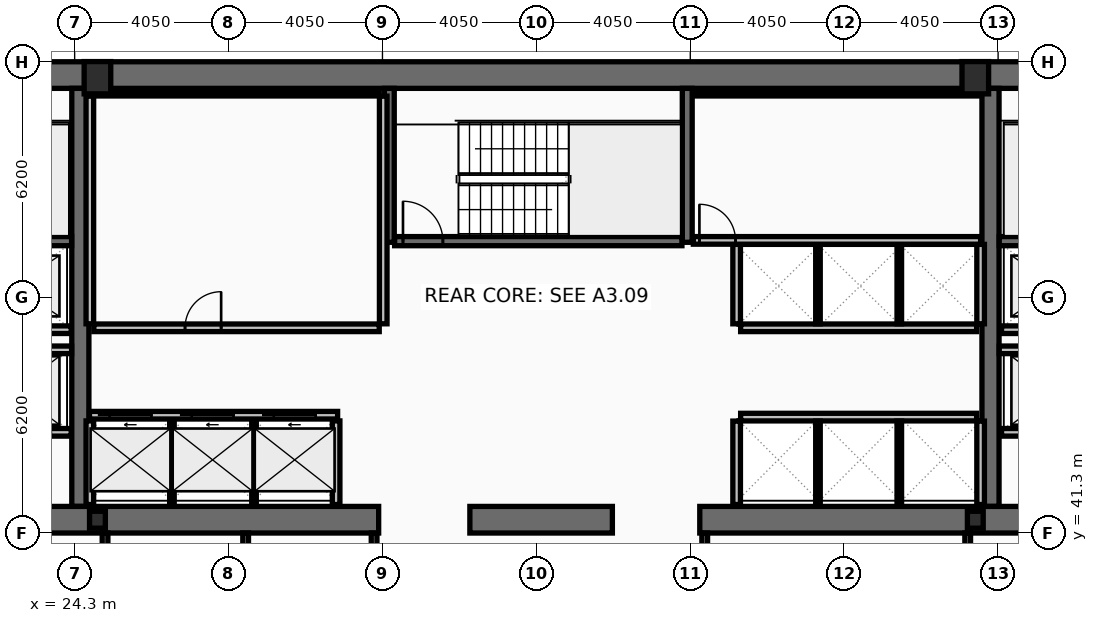
"""IFC4 building model, lengths in metres.
Left out: names, types, materials, properties, quantities, classifications, styles, units other than length and angle.
Written with IfcOpenShell. Run it as: python <this file> out.ifc"""

import sys

from ifc_helpers import new_model, si_unit, direction, frame, frame_2d, origin, origin_2d, place, context, subcontext, project, spatial, rectangle, hollow_rectangle, i_section, extrude, element, fill, save


model = new_model("IFC4")
c1 = context("Model", 3, precision=1e-05, world=origin(), true_north=direction((0.0, 1.0)))
c2 = subcontext(c1, "Body", "Model", "MODEL_VIEW")
j1 = project(units=[si_unit("LENGTHUNIT", "METRE"), si_unit("PLANEANGLEUNIT", "RADIAN")], contexts=[c1])
p1 = place(None, origin())
s1 = spatial("IfcSite", under=j1, at=p1, CompositionType="ELEMENT")
p2 = place(p1, origin())
s2 = spatial("IfcBuilding", under=s1, at=p2, CompositionType="ELEMENT")
p3 = place(p2, frame((0.0, 0.0, 139.8)))
s3 = spatial("IfcBuildingStorey", under=s2, at=p3, CompositionType="ELEMENT", Elevation=139.8)
p4 = place(p3, frame((16.2, 53.35, 0.0), z_axis=(0.0, 0.0, 1.0), x_axis=(1.0, 0.0, 0.0)))
e1 = element("IfcWall", 1, at=p4, inside=s3, PredefinedType="SHEAR", context=c2, shape_type="SweptSolid", body=[
    extrude(rectangle(XDim=40.5, YDim=0.7, at=frame_2d((20.25, 0.0))), origin(), (0.0, 0.0, 1.0), 3.44),
])
for number, where, z_axis, x_axis in (
    (2, (24.45, 42.0, 0.0), (0.0, 0.0, 1.0), (0.0, 1.0, 0.0)),
    (3, (48.4, 42.0, 0.0), (0.0, 0.0, 1.0), (0.0, 1.0, 0.0)),
):
    element("IfcWall", number, at=place(p3, frame(where, z_axis=z_axis, x_axis=x_axis)), inside=s3, PredefinedType="SHEAR", context=c2, shape_type="SweptSolid", body=[
        extrude(rectangle(XDim=11.0, YDim=0.45, at=frame_2d((5.5, 0.0))), origin(), (0.0, 0.0, 1.0), 3.44),
    ])
p5 = place(p3, frame((32.3, 41.65, 0.0), z_axis=(0.0, 0.0, 1.0), x_axis=(-1.0, 0.0, 0.0)))
e4 = element("IfcWall", 4, at=p5, inside=s3, PredefinedType="SHEAR", context=c2, shape_type="SweptSolid", body=[
    extrude(rectangle(XDim=11.45, YDim=0.7, at=frame_2d((5.725, 0.0))), origin(), (0.0, 0.0, 1.0), 3.44),
])
p6 = place(p3, frame((38.45, 41.65, 0.0), z_axis=(0.0, 0.0, 1.0), x_axis=(-1.0, 0.0, 0.0)))
e5 = element("IfcWall", 5, at=p6, inside=s3, PredefinedType="SHEAR", context=c2, shape_type="SweptSolid", body=[
    extrude(rectangle(XDim=3.75, YDim=0.7, at=frame_2d((1.875, 0.0))), origin(), (0.0, 0.0, 1.0), 3.44),
])
p7 = place(p3, frame((52.05, 41.65, 0.0), z_axis=(0.0, 0.0, 1.0), x_axis=(-1.0, 0.0, 0.0)))
e6 = element("IfcWall", 6, at=p7, inside=s3, PredefinedType="SHEAR", context=c2, shape_type="SweptSolid", body=[
    extrude(rectangle(XDim=11.3, YDim=0.7, at=frame_2d((5.65, 0.0))), origin(), (0.0, 0.0, 1.0), 3.44),
])
for number, where, z_axis, x_axis in (
    (7, (32.58, 48.95, 0.0), (0.0, 0.0, 1.0), (0.0, 1.0, 0.0)),
    (8, (40.42, 48.95, 0.0), (0.0, 0.0, 1.0), (0.0, 1.0, 0.0)),
):
    element("IfcWall", number, at=place(p3, frame(where, z_axis=z_axis, x_axis=x_axis)), inside=s3, PredefinedType="SHEAR", context=c2, shape_type="SweptSolid", body=[
        extrude(rectangle(XDim=4.05, YDim=0.26, at=frame_2d((2.025, 0.0))), origin(), (0.0, 0.0, 1.0), 3.44),
    ])
p8 = place(p3, frame((16.9, 48.98, 0.0), z_axis=(0.0, 0.0, 1.0), x_axis=(1.0, 0.0, 0.0)))
e9 = element("IfcWall", 9, at=p8, inside=s3, PredefinedType="SHEAR", context=c2, shape_type="SweptSolid", body=[
    extrude(rectangle(XDim=7.32, YDim=0.24, at=frame_2d((3.66, 0.0))), origin(), (0.0, 0.0, 1.0), 3.44),
])
p9 = place(p8, frame((0.22, 0.0, 0.0)))
e10 = element("IfcOpeningElement", 10, at=p9, cuts=e9, PredefinedType="OPENING", context=c2, shape_type="SweptSolid", body=[
    extrude(rectangle(XDim=1.05, YDim=2.15, at=frame_2d((0.525, 1.075))), frame((0.0, 0.13, 0.0), z_axis=(0.0, -1.0, 0.0), x_axis=(1.0, 0.0, 0.0)), (0.0, 0.0, 1.0), 0.26),
])
p10 = place(p3, frame((48.63, 48.98, 0.0), z_axis=(0.0, 0.0, 1.0), x_axis=(1.0, 0.0, 0.0)))
e11 = element("IfcWall", 11, at=p10, inside=s3, PredefinedType="SHEAR", context=c2, shape_type="SweptSolid", body=[
    extrude(rectangle(XDim=7.37, YDim=0.24, at=frame_2d((3.685, 0.0))), origin(), (0.0, 0.0, 1.0), 3.44),
])
p11 = place(p10, frame((6.1, 0.0, 0.0)))
e12 = element("IfcOpeningElement", 12, at=p11, cuts=e11, PredefinedType="OPENING", context=c2, shape_type="SweptSolid", body=[
    extrude(rectangle(XDim=1.05, YDim=2.15, at=frame_2d((0.525, 1.075))), frame((0.0, 0.13, 0.0), z_axis=(0.0, -1.0, 0.0), x_axis=(1.0, 0.0, 0.0)), (0.0, 0.0, 1.0), 0.26),
])
p12 = place(p3, frame((32.72, 48.98, 0.0), z_axis=(0.0, 0.0, 1.0), x_axis=(1.0, 0.0, 0.0)))
e13 = element("IfcWall", 13, at=p12, inside=s3, PredefinedType="SHEAR", context=c2, shape_type="SweptSolid", body=[
    extrude(rectangle(XDim=7.56, YDim=0.24, at=frame_2d((3.78, 0.0))), origin(), (0.0, 0.0, 1.0), 3.44),
])
p13 = place(p12, frame((0.22, 0.0, 0.0)))
e14 = element("IfcOpeningElement", 14, at=p13, cuts=e13, PredefinedType="OPENING", context=c2, shape_type="SweptSolid", body=[
    extrude(rectangle(XDim=1.05, YDim=2.15, at=frame_2d((0.525, 1.075))), frame((0.0, 0.13, 0.0), z_axis=(0.0, -1.0, 0.0), x_axis=(1.0, 0.0, 0.0)), (0.0, 0.0, 1.0), 0.26),
])
for number, where, z_axis, x_axis in (
    (15, (24.9, 53.28, 0.0), (0.0, 0.0, 1.0), (1.0, 0.0, 0.0)),
    (16, (48.0, 53.28, 0.0), (0.0, 0.0, 1.0), (1.0, 0.0, 0.0)),
):
    element("IfcColumn", number, at=place(p3, frame(where, z_axis=z_axis, x_axis=x_axis)), inside=s3, PredefinedType="COLUMN", context=c2, shape_type="SweptSolid", body=[
        extrude(hollow_rectangle(XDim=0.7, YDim=0.85, WallThickness=0.05, at=origin_2d()), origin(), (0.0, 0.0, 1.0), 3.6),
    ])
for number, where, z_axis, x_axis in (
    (17, (24.9, 41.65, 0.0), (0.0, 0.0, 1.0), (1.0, 0.0, 0.0)),
    (18, (48.0, 41.65, 0.0), (0.0, 0.0, 1.0), (1.0, 0.0, 0.0)),
):
    element("IfcColumn", number, at=place(p3, frame(where, z_axis=z_axis, x_axis=x_axis)), inside=s3, PredefinedType="COLUMN", context=c2, shape_type="SweptSolid", body=[
        extrude(i_section(OverallWidth=0.416, OverallDepth=0.446, WebThickness=0.039, FlangeThickness=0.063, at=origin_2d()), origin(), (0.0, 0.0, 1.0), 3.6),
    ])
p14 = place(p3, frame((24.69, 44.4, 0.0), z_axis=(0.0, 0.0, 1.0), x_axis=(1.0, 0.0, 0.0)))
e19 = element("IfcWall", 19, at=p14, inside=s3, PredefinedType="PARTITIONING", context=c2, shape_type="SweptSolid", body=[
    extrude(rectangle(XDim=6.53, YDim=0.2, at=frame_2d((3.265, 0.0))), origin(), (0.0, 0.0, 1.0), 3.44),
])
p15 = place(p14, frame((0.53, 0.0, 0.0)))
e20 = element("IfcOpeningElement", 20, at=p15, cuts=e19, PredefinedType="OPENING", context=c2, shape_type="SweptSolid", body=[
    extrude(rectangle(XDim=1.1, YDim=2.18, at=frame_2d((0.55, 1.09))), frame((0.0, 0.11, 0.0), z_axis=(0.0, -1.0, 0.0), x_axis=(1.0, 0.0, 0.0)), (0.0, 0.0, 1.0), 0.22),
])
p16 = place(p14, frame((2.69, 0.0, 0.0)))
e21 = element("IfcOpeningElement", 21, at=p16, cuts=e19, PredefinedType="OPENING", context=c2, shape_type="SweptSolid", body=[
    extrude(rectangle(XDim=1.1, YDim=2.18, at=frame_2d((0.55, 1.09))), frame((0.0, 0.11, 0.0), z_axis=(0.0, -1.0, 0.0), x_axis=(1.0, 0.0, 0.0)), (0.0, 0.0, 1.0), 0.22),
])
p17 = place(p14, frame((4.85, 0.0, 0.0)))
e22 = element("IfcOpeningElement", 22, at=p17, cuts=e19, PredefinedType="OPENING", context=c2, shape_type="SweptSolid", body=[
    extrude(rectangle(XDim=1.1, YDim=2.18, at=frame_2d((0.55, 1.09))), frame((0.0, 0.11, 0.0), z_axis=(0.0, -1.0, 0.0), x_axis=(1.0, 0.0, 0.0)), (0.0, 0.0, 1.0), 0.22),
])
p18 = place(p3, frame((51.61, 43.95, 0.0), z_axis=(0.0, 0.0, 1.0), x_axis=(-1.0, 0.0, 0.0)))
e23 = element("IfcWall", 23, at=p18, inside=s3, PredefinedType="PARTITIONING", context=c2, shape_type="SweptSolid", body=[
    extrude(rectangle(XDim=2.92, YDim=0.2, at=frame_2d((1.46, 0.0))), origin(), (0.0, 0.0, 1.0), 3.44),
])
p19 = place(p18, frame((0.81, 0.0, 0.0)))
e24 = element("IfcOpeningElement", 24, at=p19, cuts=e23, PredefinedType="OPENING", context=c2, shape_type="SweptSolid", body=[
    extrude(rectangle(XDim=1.3, YDim=2.18, at=frame_2d((0.65, 1.09))), frame((0.0, 0.11, 0.0), z_axis=(0.0, -1.0, 0.0), x_axis=(1.0, 0.0, 0.0)), (0.0, 0.0, 1.0), 0.22),
])
p20 = place(p3, frame((24.21, 43.95, 0.0), z_axis=(0.0, 0.0, 1.0), x_axis=(-1.0, 0.0, 0.0)))
e25 = element("IfcWall", 25, at=p20, inside=s3, PredefinedType="PARTITIONING", context=c2, shape_type="SweptSolid", body=[
    extrude(rectangle(XDim=2.97, YDim=0.2, at=frame_2d((1.485, 0.0))), origin(), (0.0, 0.0, 1.0), 3.44),
])
p21 = place(p20, frame((0.86, 0.0, 0.0)))
e26 = element("IfcOpeningElement", 26, at=p21, cuts=e25, PredefinedType="OPENING", context=c2, shape_type="SweptSolid", body=[
    extrude(rectangle(XDim=1.3, YDim=2.18, at=frame_2d((0.65, 1.09))), frame((0.0, 0.11, 0.0), z_axis=(0.0, -1.0, 0.0), x_axis=(1.0, 0.0, 0.0)), (0.0, 0.0, 1.0), 0.22),
])
p22 = place(p3, frame((51.61, 46.65, 0.0), z_axis=(0.0, 0.0, 1.0), x_axis=(-1.0, 0.0, 0.0)))
e27 = element("IfcWall", 27, at=p22, inside=s3, PredefinedType="PARTITIONING", context=c2, shape_type="SweptSolid", body=[
    extrude(rectangle(XDim=2.92, YDim=0.2, at=frame_2d((1.46, 0.0))), origin(), (0.0, 0.0, 1.0), 3.44),
])
p23 = place(p22, frame((0.86, 0.0, 0.0)))
e28 = element("IfcOpeningElement", 28, at=p23, cuts=e27, PredefinedType="OPENING", context=c2, shape_type="SweptSolid", body=[
    extrude(rectangle(XDim=1.2, YDim=2.18, at=frame_2d((0.6, 1.09))), frame((0.0, 0.11, 0.0), z_axis=(0.0, -1.0, 0.0), x_axis=(1.0, 0.0, 0.0)), (0.0, 0.0, 1.0), 0.22),
])
p24 = place(p3, frame((24.21, 46.65, 0.0), z_axis=(0.0, 0.0, 1.0), x_axis=(-1.0, 0.0, 0.0)))
e29 = element("IfcWall", 29, at=p24, inside=s3, PredefinedType="PARTITIONING", context=c2, shape_type="SweptSolid", body=[
    extrude(rectangle(XDim=2.97, YDim=0.2, at=frame_2d((1.485, 0.0))), origin(), (0.0, 0.0, 1.0), 3.44),
])
p25 = place(p24, frame((0.91, 0.0, 0.0)))
e30 = element("IfcOpeningElement", 30, at=p25, cuts=e29, PredefinedType="OPENING", context=c2, shape_type="SweptSolid", body=[
    extrude(rectangle(XDim=1.2, YDim=2.18, at=frame_2d((0.6, 1.09))), frame((0.0, 0.11, 0.0), z_axis=(0.0, -1.0, 0.0), x_axis=(1.0, 0.0, 0.0)), (0.0, 0.0, 1.0), 0.22),
])
p26 = place(p3, frame((21.2, 46.12, 0.0), z_axis=(0.0, 0.0, 1.0), x_axis=(1.0, 0.0, 0.0)))
e31 = element("IfcWall", 31, at=p26, inside=s3, PredefinedType="PARTITIONING", context=c2, shape_type="SweptSolid", body=[
    extrude(rectangle(XDim=3.02, YDim=0.2, at=frame_2d((1.51, 0.0))), origin(), (0.0, 0.0, 1.0), 3.44),
])
p27 = place(p3, frame((48.63, 46.12, 0.0), z_axis=(0.0, 0.0, 1.0), x_axis=(1.0, 0.0, 0.0)))
e32 = element("IfcWall", 32, at=p27, inside=s3, PredefinedType="PARTITIONING", context=c2, shape_type="SweptSolid", body=[
    extrude(rectangle(XDim=3.07, YDim=0.2, at=frame_2d((1.535, 0.0))), origin(), (0.0, 0.0, 1.0), 3.44),
])
for number, where, z_axis, x_axis in (
    (33, (24.7, 46.805, 0.0), (0.0, 0.0, 1.0), (0.0, 1.0, 0.0)),
    (34, (32.42, 46.805, 0.0), (0.0, 0.0, 1.0), (0.0, 1.0, 0.0)),
):
    element("IfcWall", number, at=place(p3, frame(where, z_axis=z_axis, x_axis=x_axis)), inside=s3, PredefinedType="PARTITIONING", context=c2, shape_type="SweptSolid", body=[
        extrude(rectangle(XDim=5.99, YDim=0.2, at=frame_2d((2.995, 0.0))), origin(), (0.0, 0.0, 1.0), 3.44),
    ])
p28 = place(p3, frame((24.805, 52.86, 0.0), z_axis=(0.0, 0.0, 1.0), x_axis=(1.0, 0.0, 0.0)))
e35 = element("IfcWall", 35, at=p28, inside=s3, PredefinedType="PARTITIONING", context=c2, shape_type="SweptSolid", body=[
    extrude(rectangle(XDim=7.51, YDim=0.12, at=frame_2d((3.755, 0.0))), origin(), (0.0, 0.0, 1.0), 3.44),
])
p29 = place(p3, frame((24.805, 46.7, 0.0), z_axis=(0.0, 0.0, 1.0), x_axis=(1.0, 0.0, 0.0)))
e36 = element("IfcWall", 36, at=p29, inside=s3, PredefinedType="PARTITIONING", context=c2, shape_type="SweptSolid", body=[
    extrude(rectangle(XDim=7.51, YDim=0.2, at=frame_2d((3.755, 0.0))), origin(), (0.0, 0.0, 1.0), 3.44),
])
p30 = place(p29, frame((2.4, 0.0, 0.0)))
e37 = element("IfcOpeningElement", 37, at=p30, cuts=e36, PredefinedType="OPENING", context=c2, shape_type="SweptSolid", body=[
    extrude(rectangle(XDim=0.95, YDim=2.1, at=frame_2d((0.475, 1.05))), frame((0.0, 0.11, 0.0), z_axis=(0.0, -1.0, 0.0), x_axis=(1.0, 0.0, 0.0)), (0.0, 0.0, 1.0), 0.22),
])
for number, where, z_axis, x_axis in (
    (38, (24.7, 42.05, 0.0), (0.0, 0.0, 1.0), (0.0, 1.0, 0.0)),
    (39, (31.18, 42.05, 0.0), (0.0, 0.0, 1.0), (0.0, 1.0, 0.0)),
):
    element("IfcWall", number, at=place(p3, frame(where, z_axis=z_axis, x_axis=x_axis)), inside=s3, PredefinedType="PARTITIONING", context=c2, shape_type="SweptSolid", body=[
        extrude(rectangle(XDim=2.2, YDim=0.2, at=frame_2d((1.1, 0.0))), origin(), (0.0, 0.0, 1.0), 3.44),
    ])
for number, where, z_axis, x_axis in (
    (40, (26.86, 42.05, 0.0), (0.0, 0.0, 1.0), (0.0, 1.0, 0.0)),
    (41, (29.02, 42.05, 0.0), (0.0, 0.0, 1.0), (0.0, 1.0, 0.0)),
):
    element("IfcWall", number, at=place(p3, frame(where, z_axis=z_axis, x_axis=x_axis)), inside=s3, PredefinedType="PARTITIONING", context=c2, shape_type="SweptSolid", body=[
        extrude(rectangle(XDim=2.2, YDim=0.12, at=frame_2d((1.1, 0.0))), origin(), (0.0, 0.0, 1.0), 3.44),
    ])
p31 = place(p3, frame((41.825, 46.7, 0.0), z_axis=(0.0, 0.0, 1.0), x_axis=(1.0, 0.0, 0.0)))
e42 = element("IfcWall", 42, at=p31, inside=s3, PredefinedType="PARTITIONING", context=c2, shape_type="SweptSolid", body=[
    extrude(rectangle(XDim=6.21, YDim=0.2, at=frame_2d((3.105, 0.0))), origin(), (0.0, 0.0, 1.0), 3.44),
])
for number, where, z_axis, x_axis in (
    (43, (41.72, 46.805, 0.0), (0.0, 0.0, 1.0), (0.0, 1.0, 0.0)),
    (44, (48.14, 46.805, 0.0), (0.0, 0.0, 1.0), (0.0, 1.0, 0.0)),
):
    element("IfcWall", number, at=place(p3, frame(where, z_axis=z_axis, x_axis=x_axis)), inside=s3, PredefinedType="PARTITIONING", context=c2, shape_type="SweptSolid", body=[
        extrude(rectangle(XDim=2.09, YDim=0.2, at=frame_2d((1.045, 0.0))), origin(), (0.0, 0.0, 1.0), 3.44),
    ])
for number, where, z_axis, x_axis in (
    (45, (43.86, 46.805, 0.0), (0.0, 0.0, 1.0), (0.0, 1.0, 0.0)),
    (46, (46.0, 46.805, 0.0), (0.0, 0.0, 1.0), (0.0, 1.0, 0.0)),
):
    element("IfcWall", number, at=place(p3, frame(where, z_axis=z_axis, x_axis=x_axis)), inside=s3, PredefinedType="PARTITIONING", context=c2, shape_type="SweptSolid", body=[
        extrude(rectangle(XDim=2.09, YDim=0.12, at=frame_2d((1.045, 0.0))), origin(), (0.0, 0.0, 1.0), 3.44),
    ])
p32 = place(p3, frame((41.825, 44.35, 0.0), z_axis=(0.0, 0.0, 1.0), x_axis=(1.0, 0.0, 0.0)))
e47 = element("IfcWall", 47, at=p32, inside=s3, PredefinedType="PARTITIONING", context=c2, shape_type="SweptSolid", body=[
    extrude(rectangle(XDim=6.21, YDim=0.2, at=frame_2d((3.105, 0.0))), origin(), (0.0, 0.0, 1.0), 3.44),
])
for number, where, z_axis, x_axis in (
    (48, (41.72, 42.05, 0.0), (0.0, 0.0, 1.0), (0.0, 1.0, 0.0)),
    (49, (48.14, 42.05, 0.0), (0.0, 0.0, 1.0), (0.0, 1.0, 0.0)),
):
    element("IfcWall", number, at=place(p3, frame(where, z_axis=z_axis, x_axis=x_axis)), inside=s3, PredefinedType="PARTITIONING", context=c2, shape_type="SweptSolid", body=[
        extrude(rectangle(XDim=2.195, YDim=0.2, at=frame_2d((1.098, 0.0))), origin(), (0.0, 0.0, 1.0), 3.44),
    ])
for number, where, z_axis, x_axis in (
    (50, (43.86, 42.05, 0.0), (0.0, 0.0, 1.0), (0.0, 1.0, 0.0)),
    (51, (46.0, 42.05, 0.0), (0.0, 0.0, 1.0), (0.0, 1.0, 0.0)),
):
    element("IfcWall", number, at=place(p3, frame(where, z_axis=z_axis, x_axis=x_axis)), inside=s3, PredefinedType="PARTITIONING", context=c2, shape_type="SweptSolid", body=[
        extrude(rectangle(XDim=2.195, YDim=0.12, at=frame_2d((1.098, 0.0))), origin(), (0.0, 0.0, 1.0), 3.44),
    ])
p33 = place(p3, frame((40.58, 52.86, 0.0), z_axis=(0.0, 0.0, 1.0), x_axis=(1.0, 0.0, 0.0)))
e52 = element("IfcWall", 52, at=p33, inside=s3, PredefinedType="PARTITIONING", context=c2, shape_type="SweptSolid", body=[
    extrude(rectangle(XDim=7.56, YDim=0.12, at=frame_2d((3.78, 0.0))), origin(), (0.0, 0.0, 1.0), 3.44),
])
p34 = place(p3, frame((40.58, 49.0, 0.0), z_axis=(0.0, 0.0, 1.0), x_axis=(1.0, 0.0, 0.0)))
e53 = element("IfcWall", 53, at=p34, inside=s3, PredefinedType="PARTITIONING", context=c2, shape_type="SweptSolid", body=[
    extrude(rectangle(XDim=7.56, YDim=0.2, at=frame_2d((3.78, 0.0))), origin(), (0.0, 0.0, 1.0), 3.44),
])
p35 = place(p34, frame((0.16, 0.0, 0.0)))
e54 = element("IfcOpeningElement", 54, at=p35, cuts=e53, PredefinedType="OPENING", context=c2, shape_type="SweptSolid", body=[
    extrude(rectangle(XDim=0.95, YDim=2.1, at=frame_2d((0.475, 1.05))), frame((0.0, 0.11, 0.0), z_axis=(0.0, -1.0, 0.0), x_axis=(1.0, 0.0, 0.0)), (0.0, 0.0, 1.0), 0.22),
])
p36 = place(p3, frame((25.1, 38.28, 0.0), z_axis=(0.0, 0.0, 1.0), x_axis=(0.0, 1.0, 0.0)))
e55 = element("IfcWall", 55, at=p36, inside=s3, PredefinedType="PARTITIONING", context=c2, shape_type="SweptSolid", body=[
    extrude(rectangle(XDim=3.02, YDim=0.15, at=frame_2d((1.51, 0.0))), origin(), (0.0, 0.0, 1.0), 2.73),
])
for number, where, z_axis, x_axis in (
    (56, (28.8, 38.28, 0.0), (0.0, 0.0, 1.0), (0.0, 1.0, 0.0)),
    (57, (32.18, 38.28, 0.0), (0.0, 0.0, 1.0), (0.0, 1.0, 0.0)),
    (58, (40.88, 38.28, 0.0), (0.0, 0.0, 1.0), (0.0, 1.0, 0.0)),
):
    element("IfcWall", number, at=place(p3, frame(where, z_axis=z_axis, x_axis=x_axis)), inside=s3, PredefinedType="PARTITIONING", context=c2, shape_type="SweptSolid", body=[
        extrude(rectangle(XDim=3.02, YDim=0.15, at=frame_2d((1.51, 0.0))), origin(), (0.0, 0.0, 1.0), 3.44),
    ])
p37 = place(p3, frame((47.8, 38.28, 0.0), z_axis=(0.0, 0.0, 1.0), x_axis=(0.0, 1.0, 0.0)))
e59 = element("IfcWall", 59, at=p37, inside=s3, PredefinedType="PARTITIONING", context=c2, shape_type="SweptSolid", body=[
    extrude(rectangle(XDim=3.02, YDim=0.15, at=frame_2d((1.51, 0.0))), origin(), (0.0, 0.0, 1.0), 2.73),
])
p38 = place(p13, origin())
e60 = element("IfcDoor", 60, at=p38, inside=s3, OperationType="SINGLE_SWING_LEFT", PredefinedType="DOOR", context=c2, shape_type="SweptSolid", body=[
    extrude(rectangle(XDim=1.05, YDim=2.15, at=frame_2d((0.525, 1.075))), frame((0.0, 0.025, 0.0), z_axis=(0.0, -1.0, 0.0), x_axis=(1.0, 0.0, 0.0)), (0.0, 0.0, 1.0), 0.05),
])
fill(e14, e60)
p39 = place(p15, origin())
e61 = element("IfcDoor", 61, at=p39, inside=s3, OperationType="SLIDING_TO_LEFT", PredefinedType="DOOR", context=c2, shape_type="SweptSolid", body=[
    extrude(rectangle(XDim=1.1, YDim=2.18, at=frame_2d((0.55, 1.09))), frame((0.0, 0.025, 0.0), z_axis=(0.0, -1.0, 0.0), x_axis=(1.0, 0.0, 0.0)), (0.0, 0.0, 1.0), 0.05),
])
fill(e20, e61)
p40 = place(p16, origin())
e62 = element("IfcDoor", 62, at=p40, inside=s3, OperationType="SLIDING_TO_LEFT", PredefinedType="DOOR", context=c2, shape_type="SweptSolid", body=[
    extrude(rectangle(XDim=1.1, YDim=2.18, at=frame_2d((0.55, 1.09))), frame((0.0, 0.025, 0.0), z_axis=(0.0, -1.0, 0.0), x_axis=(1.0, 0.0, 0.0)), (0.0, 0.0, 1.0), 0.05),
])
fill(e21, e62)
p41 = place(p17, origin())
e63 = element("IfcDoor", 63, at=p41, inside=s3, OperationType="SLIDING_TO_LEFT", PredefinedType="DOOR", context=c2, shape_type="SweptSolid", body=[
    extrude(rectangle(XDim=1.1, YDim=2.18, at=frame_2d((0.55, 1.09))), frame((0.0, 0.025, 0.0), z_axis=(0.0, -1.0, 0.0), x_axis=(1.0, 0.0, 0.0)), (0.0, 0.0, 1.0), 0.05),
])
fill(e22, e63)
p42 = place(p30, origin())
e64 = element("IfcDoor", 64, at=p42, inside=s3, OperationType="SINGLE_SWING_RIGHT", PredefinedType="DOOR", context=c2, shape_type="SweptSolid", body=[
    extrude(rectangle(XDim=0.95, YDim=2.1, at=frame_2d((0.475, 1.05))), frame((0.0, 0.025, 0.0), z_axis=(0.0, -1.0, 0.0), x_axis=(1.0, 0.0, 0.0)), (0.0, 0.0, 1.0), 0.05),
])
fill(e37, e64)
p43 = place(p35, origin())
e65 = element("IfcDoor", 65, at=p43, inside=s3, OperationType="SINGLE_SWING_LEFT", PredefinedType="DOOR", context=c2, shape_type="SweptSolid", body=[
    extrude(rectangle(XDim=0.95, YDim=2.1, at=frame_2d((0.475, 1.05))), frame((0.0, 0.025, 0.0), z_axis=(0.0, -1.0, 0.0), x_axis=(1.0, 0.0, 0.0)), (0.0, 0.0, 1.0), 0.05),
])
fill(e54, e65)
save(model, sys.argv[1])
